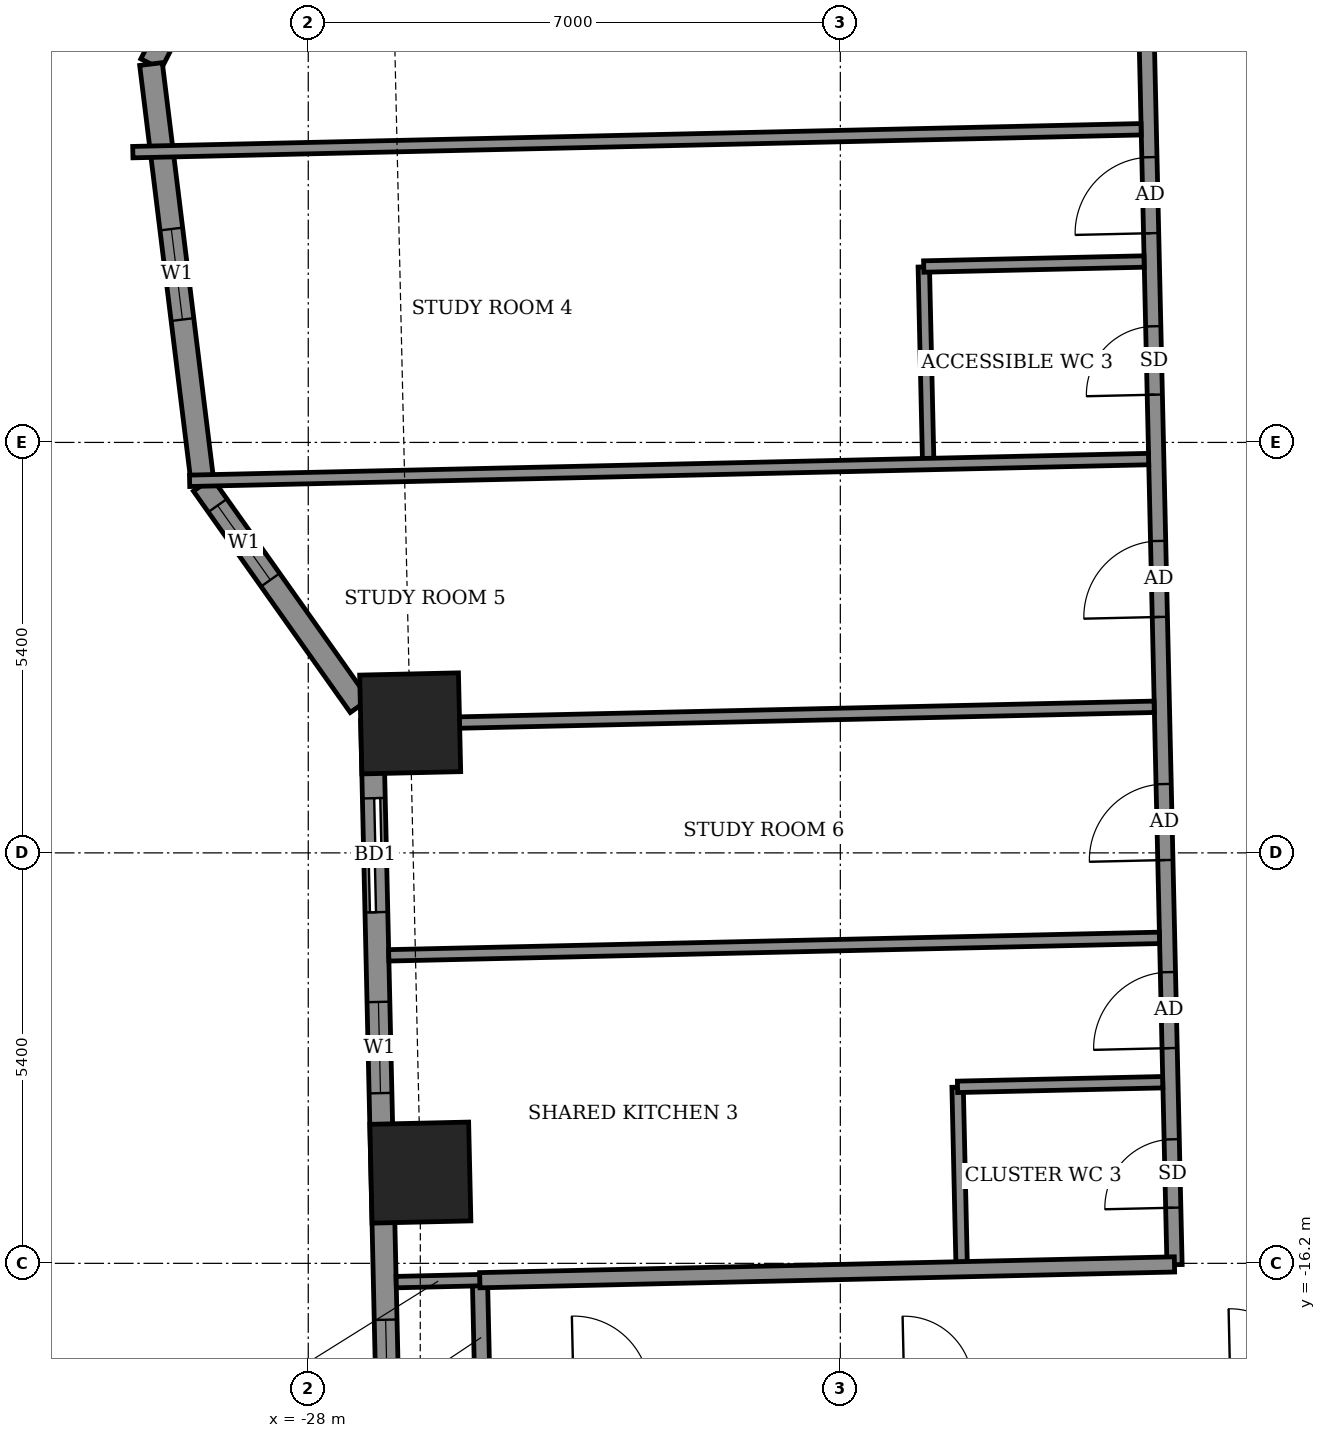
"""IFC4 building model, lengths in metres.
Left out: names, types, materials, properties, quantities, classifications, styles, units other than length and angle.
Written with IfcOpenShell. Run it as: python <this file> out.ifc"""

import sys

from ifc_helpers import new_model, si_unit, direction, frame, frame_2d, origin, origin_2d, place, context, subcontext, project, spatial, rectangle, extrude, element, fill, save


model = new_model("IFC4")
c1 = context("Model", 3, precision=1e-05, world=origin(), true_north=direction((0.0, 1.0)))
c2 = subcontext(c1, "Body", "Model", "MODEL_VIEW")
j1 = project(units=[si_unit("LENGTHUNIT", "METRE"), si_unit("PLANEANGLEUNIT", "RADIAN")], contexts=[c1])
p1 = place(None, origin())
s1 = spatial("IfcSite", under=j1, at=p1, CompositionType="ELEMENT")
p2 = place(p1, origin())
s2 = spatial("IfcBuilding", under=s1, at=p2, CompositionType="ELEMENT")
p3 = place(p2, frame((0.0, 0.0, 130.1)))
s3 = spatial("IfcBuildingStorey", under=s2, at=p3, CompositionType="ELEMENT", Elevation=130.1)
for number, where, z_axis, x_axis in (
    (1, (-26.659, -9.096, -0.55), (0.0, 0.0, 1.0), (0.023, -1.0, 0.0)),
    (2, (-26.525, -15.006, -0.55), (0.0, 0.0, 1.0), (0.023, -1.0, 0.0)),
):
    element("IfcColumn", number, at=place(p3, frame(where, z_axis=z_axis, x_axis=x_axis)), inside=s3, PredefinedType="COLUMN", context=c2, shape_type="SweptSolid", body=[
        extrude(rectangle(XDim=1.3, YDim=1.3, at=origin_2d()), origin(), (0.0, 0.0, 1.0), 3.6),
    ])
p4 = place(p3, frame((-27.625, 4.392, 0.0), z_axis=(0.0, 0.0, 1.0), x_axis=(-0.45268572245, -0.891670138947, 0.0)))
e3 = element("IfcWall", 3, at=p4, inside=s3, PredefinedType="SOLIDWALL", context=c2, shape_type="SweptSolid", body=[
    extrude(rectangle(XDim=5.399, YDim=0.3, at=frame_2d((2.7, 0.0))), origin(), (0.0, 0.0, 1.0), 3.05),
])
p5 = place(p4, frame((2.008, 0.0, 0.9)))
e4 = element("IfcOpeningElement", 4, at=p5, cuts=e3, PredefinedType="OPENING", context=c2, shape_type="SweptSolid", body=[
    extrude(rectangle(XDim=1.2, YDim=1.5, at=frame_2d((0.6, 0.75))), frame((0.0, 0.16, 0.0), z_axis=(0.0, -1.0, 0.0), x_axis=(1.0, 0.0, 0.0)), (0.0, 0.0, 1.0), 0.32),
])
p6 = place(p3, frame((-30.069, -0.422, 0.0), z_axis=(0.0, 0.0, 1.0), x_axis=(0.122206978992, -0.992504636909, 0.0)))
e5 = element("IfcWall", 5, at=p6, inside=s3, PredefinedType="SOLIDWALL", context=c2, shape_type="SweptSolid", body=[
    extrude(rectangle(XDim=5.574, YDim=0.3, at=frame_2d((2.787, 0.0))), origin(), (0.0, 0.0, 1.0), 3.05),
])
p7 = place(p6, frame((2.187, 0.0, 0.9)))
e6 = element("IfcOpeningElement", 6, at=p7, cuts=e5, PredefinedType="OPENING", context=c2, shape_type="SweptSolid", body=[
    extrude(rectangle(XDim=1.2, YDim=1.5, at=frame_2d((0.6, 0.75))), frame((0.0, 0.16, 0.0), z_axis=(0.0, -1.0, 0.0), x_axis=(1.0, 0.0, 0.0)), (0.0, 0.0, 1.0), 0.32),
])
p8 = place(p3, frame((-29.388, -5.954, 0.0), z_axis=(0.0, 0.0, 1.0), x_axis=(0.578095163598, -0.815969351033, 0.0)))
e7 = element("IfcWall", 7, at=p8, inside=s3, PredefinedType="SOLIDWALL", context=c2, shape_type="SweptSolid", body=[
    extrude(rectangle(XDim=3.569, YDim=0.3, at=frame_2d((1.784, 0.0))), origin(), (0.0, 0.0, 1.0), 3.05),
])
p9 = place(p8, frame((0.338, 0.0, 0.9)))
e8 = element("IfcOpeningElement", 8, at=p9, cuts=e7, PredefinedType="OPENING", context=c2, shape_type="SweptSolid", body=[
    extrude(rectangle(XDim=1.2, YDim=1.5, at=frame_2d((0.6, 0.75))), frame((0.0, 0.16, 0.0), z_axis=(0.0, -1.0, 0.0), x_axis=(1.0, 0.0, 0.0)), (0.0, 0.0, 1.0), 0.32),
])
p10 = place(p3, frame((-27.161, -9.052, 0.0), z_axis=(0.0, 0.0, 1.0), x_axis=(0.022665616813, -0.999743101909, 0.0)))
e9 = element("IfcWall", 9, at=p10, inside=s3, PredefinedType="SOLIDWALL", context=c2, shape_type="SweptSolid", body=[
    extrude(rectangle(XDim=11.73, YDim=0.3, at=frame_2d((5.865, 0.0))), origin(), (0.0, 0.0, 1.0), 3.05),
])
p11 = place(p10, frame((1.029, 0.0, 0.0)))
e10 = element("IfcOpeningElement", 10, at=p11, cuts=e9, PredefinedType="OPENING", context=c2, shape_type="SweptSolid", body=[
    extrude(rectangle(XDim=1.5, YDim=2.4, at=frame_2d((0.75, 1.2))), frame((0.0, 0.16, 0.0), z_axis=(0.0, -1.0, 0.0), x_axis=(1.0, 0.0, 0.0)), (0.0, 0.0, 1.0), 0.32),
])
p12 = place(p10, frame((3.71, 0.0, 0.9)))
e11 = element("IfcOpeningElement", 11, at=p12, cuts=e9, PredefinedType="OPENING", context=c2, shape_type="SweptSolid", body=[
    extrude(rectangle(XDim=1.2, YDim=1.5, at=frame_2d((0.6, 0.75))), frame((0.0, 0.16, 0.0), z_axis=(0.0, -1.0, 0.0), x_axis=(1.0, 0.0, 0.0)), (0.0, 0.0, 1.0), 0.32),
])
p13 = place(p10, frame((7.892, 0.0, 0.9)))
e12 = element("IfcOpeningElement", 12, at=p13, cuts=e9, PredefinedType="OPENING", context=c2, shape_type="SweptSolid", body=[
    extrude(rectangle(XDim=2.4, YDim=1.5, at=frame_2d((1.2, 0.75))), frame((0.0, 0.16, 0.0), z_axis=(0.0, -1.0, 0.0), x_axis=(1.0, 0.0, 0.0)), (0.0, 0.0, 1.0), 0.32),
])
p14 = place(p3, frame((-25.707, -17.925, 0.0), z_axis=(0.0, 0.0, 1.0), x_axis=(-0.022617910375, 0.999744182344, 0.0)))
e13 = element("IfcWall", 13, at=p14, inside=s3, PredefinedType="PARTITIONING", context=c2, shape_type="SweptSolid", body=[
    extrude(rectangle(XDim=1.5, YDim=0.2, at=frame_2d((0.75, 0.0))), origin(), (0.0, 0.0, 1.0), 3.05),
])
p15 = place(p3, frame((-19.405, -16.182, 0.0), z_axis=(0.0, 0.0, 1.0), x_axis=(-0.022605686808, 0.999744458811, 0.0)))
e14 = element("IfcWall", 14, at=p15, inside=s3, PredefinedType="PARTITIONING", context=c2, shape_type="SweptSolid", body=[
    extrude(rectangle(XDim=2.3, YDim=0.15, at=frame_2d((1.15, 0.0))), origin(), (0.0, 0.0, 1.0), 3.05),
])
p16 = place(p3, frame((-16.603, -16.218, 0.0), z_axis=(0.0, 0.0, 1.0), x_axis=(-0.022698146637, 0.999742363881, 0.0)))
e15 = element("IfcWall", 15, at=p16, inside=s3, PredefinedType="PARTITIONING", context=c2, shape_type="SweptSolid", body=[
    extrude(rectangle(XDim=28.374, YDim=0.2, at=frame_2d((14.187, 0.0))), origin(), (0.0, 0.0, 1.0), 3.05),
])
p17 = place(p16, frame((24.537, 0.0, 0.0)))
e16 = element("IfcOpeningElement", 16, at=p17, cuts=e15, PredefinedType="OPENING", context=c2, shape_type="SweptSolid", body=[
    extrude(rectangle(XDim=1.0, YDim=2.1, at=frame_2d((0.5, 1.05))), frame((0.0, 0.11, 0.0), z_axis=(0.0, -1.0, 0.0), x_axis=(1.0, 0.0, 0.0)), (0.0, 0.0, 1.0), 0.22),
])
p18 = place(p16, frame((26.724, 0.0, 0.0)))
e17 = element("IfcOpeningElement", 17, at=p18, cuts=e15, PredefinedType="OPENING", context=c2, shape_type="SweptSolid", body=[
    extrude(rectangle(XDim=0.9, YDim=2.1, at=frame_2d((0.45, 1.05))), frame((0.0, 0.11, 0.0), z_axis=(0.0, -1.0, 0.0), x_axis=(1.0, 0.0, 0.0)), (0.0, 0.0, 1.0), 0.22),
])
p19 = place(p16, frame((22.099, 0.0, 0.0)))
e18 = element("IfcOpeningElement", 18, at=p19, cuts=e15, PredefinedType="OPENING", context=c2, shape_type="SweptSolid", body=[
    extrude(rectangle(XDim=1.0, YDim=2.1, at=frame_2d((0.5, 1.05))), frame((0.0, 0.11, 0.0), z_axis=(0.0, -1.0, 0.0), x_axis=(1.0, 0.0, 0.0)), (0.0, 0.0, 1.0), 0.22),
])
p20 = place(p16, frame((16.324, 0.0, 0.0)))
e19 = element("IfcOpeningElement", 19, at=p20, cuts=e15, PredefinedType="OPENING", context=c2, shape_type="SweptSolid", body=[
    extrude(rectangle(XDim=1.0, YDim=2.1, at=frame_2d((0.5, 1.05))), frame((0.0, 0.11, 0.0), z_axis=(0.0, -1.0, 0.0), x_axis=(1.0, 0.0, 0.0)), (0.0, 0.0, 1.0), 0.22),
])
p21 = place(p16, frame((19.449, 0.0, 0.0)))
e20 = element("IfcOpeningElement", 20, at=p21, cuts=e15, PredefinedType="OPENING", context=c2, shape_type="SweptSolid", body=[
    extrude(rectangle(XDim=0.9, YDim=2.1, at=frame_2d((0.45, 1.05))), frame((0.0, 0.11, 0.0), z_axis=(0.0, -1.0, 0.0), x_axis=(1.0, 0.0, 0.0)), (0.0, 0.0, 1.0), 0.22),
])
p22 = place(p16, frame((13.574, 0.0, 0.0)))
e21 = element("IfcOpeningElement", 21, at=p22, cuts=e15, PredefinedType="OPENING", context=c2, shape_type="SweptSolid", body=[
    extrude(rectangle(XDim=1.0, YDim=2.1, at=frame_2d((0.5, 1.05))), frame((0.0, 0.11, 0.0), z_axis=(0.0, -1.0, 0.0), x_axis=(1.0, 0.0, 0.0)), (0.0, 0.0, 1.0), 0.22),
])
p23 = place(p16, frame((11.449, 0.0, 0.0)))
e22 = element("IfcOpeningElement", 22, at=p23, cuts=e15, PredefinedType="OPENING", context=c2, shape_type="SweptSolid", body=[
    extrude(rectangle(XDim=0.9, YDim=2.1, at=frame_2d((0.45, 1.05))), frame((0.0, 0.11, 0.0), z_axis=(0.0, -1.0, 0.0), x_axis=(1.0, 0.0, 0.0)), (0.0, 0.0, 1.0), 0.22),
])
p24 = place(p16, frame((8.524, 0.0, 0.0)))
e23 = element("IfcOpeningElement", 23, at=p24, cuts=e15, PredefinedType="OPENING", context=c2, shape_type="SweptSolid", body=[
    extrude(rectangle(XDim=1.0, YDim=2.1, at=frame_2d((0.5, 1.05))), frame((0.0, 0.11, 0.0), z_axis=(0.0, -1.0, 0.0), x_axis=(1.0, 0.0, 0.0)), (0.0, 0.0, 1.0), 0.22),
])
p25 = place(p16, frame((5.325, 0.0, 0.0)))
e24 = element("IfcOpeningElement", 24, at=p25, cuts=e15, PredefinedType="OPENING", context=c2, shape_type="SweptSolid", body=[
    extrude(rectangle(XDim=1.0, YDim=2.1, at=frame_2d((0.5, 1.05))), frame((0.0, 0.11, 0.0), z_axis=(0.0, -1.0, 0.0), x_axis=(1.0, 0.0, 0.0)), (0.0, 0.0, 1.0), 0.22),
])
p26 = place(p16, frame((2.85, 0.0, 0.0)))
e25 = element("IfcOpeningElement", 25, at=p26, cuts=e15, PredefinedType="OPENING", context=c2, shape_type="SweptSolid", body=[
    extrude(rectangle(XDim=1.0, YDim=2.1, at=frame_2d((0.5, 1.05))), frame((0.0, 0.11, 0.0), z_axis=(0.0, -1.0, 0.0), x_axis=(1.0, 0.0, 0.0)), (0.0, 0.0, 1.0), 0.22),
])
p27 = place(p16, frame((0.75, 0.0, 0.0)))
e26 = element("IfcOpeningElement", 26, at=p27, cuts=e15, PredefinedType="OPENING", context=c2, shape_type="SweptSolid", body=[
    extrude(rectangle(XDim=0.9, YDim=2.1, at=frame_2d((0.45, 1.05))), frame((0.0, 0.11, 0.0), z_axis=(0.0, -1.0, 0.0), x_axis=(1.0, 0.0, 0.0)), (0.0, 0.0, 1.0), 0.22),
])
p28 = place(p3, frame((-26.843, -16.447, 0.0), z_axis=(0.0, 0.0, 1.0), x_axis=(0.999720170098, 0.023655475055, 0.0)))
e27 = element("IfcWall", 27, at=p28, inside=s3, PredefinedType="PARTITIONING", context=c2, shape_type="SweptSolid", body=[
    extrude(rectangle(XDim=1.104, YDim=0.15, at=frame_2d((0.552, 0.0))), origin(), (0.0, 0.0, 1.0), 2.55),
])
p29 = place(p3, frame((-25.743, -16.422, 0.0), z_axis=(0.0, 0.0, 1.0), x_axis=(0.999741076645, 0.022754772455, 0.0)))
e28 = element("IfcWall", 28, at=p29, inside=s3, PredefinedType="PARTITIONING", context=c2, shape_type="SweptSolid", body=[
    extrude(rectangle(XDim=9.141, YDim=0.2, at=frame_2d((4.571, 0.0))), origin(), (0.0, 0.0, 1.0), 3.05),
])
p30 = place(p3, frame((-19.458, -13.878, 0.0), z_axis=(0.0, 0.0, 1.0), x_axis=(0.999744396973, 0.02260842146, 0.0)))
e29 = element("IfcWall", 29, at=p30, inside=s3, PredefinedType="PARTITIONING", context=c2, shape_type="SweptSolid", body=[
    extrude(rectangle(XDim=2.7, YDim=0.15, at=frame_2d((1.35, 0.0))), origin(), (0.0, 0.0, 1.0), 3.05),
])
p31 = place(p3, frame((-26.941, -12.148, 0.0), z_axis=(0.0, 0.0, 1.0), x_axis=(0.999742841246, 0.022677111331, 0.0)))
e30 = element("IfcWall", 30, at=p31, inside=s3, PredefinedType="PARTITIONING", context=c2, shape_type="SweptSolid", body=[
    extrude(rectangle(XDim=10.142, YDim=0.15, at=frame_2d((5.071, 0.0))), origin(), (0.0, 0.0, 1.0), 2.55),
])
p32 = place(p3, frame((-27.01, -9.108, 0.0), z_axis=(0.0, 0.0, 1.0), x_axis=(0.999742841246, 0.022677111331, 0.0)))
e31 = element("IfcWall", 31, at=p32, inside=s3, PredefinedType="PARTITIONING", context=c2, shape_type="SweptSolid", body=[
    extrude(rectangle(XDim=10.142, YDim=0.15, at=frame_2d((5.071, 0.0))), origin(), (0.0, 0.0, 1.0), 3.05),
])
p33 = place(p3, frame((-19.845, -5.615, 0.0), z_axis=(0.0, 0.0, 1.0), x_axis=(-0.022629142889, 0.99974392816, 0.0)))
e32 = element("IfcWall", 32, at=p33, inside=s3, PredefinedType="PARTITIONING", context=c2, shape_type="SweptSolid", body=[
    extrude(rectangle(XDim=2.525, YDim=0.15, at=frame_2d((1.262, 0.0))), origin(), (0.0, 0.0, 1.0), 3.05),
])
p34 = place(p3, frame((-29.561, -5.905, 0.0), z_axis=(0.0, 0.0, 1.0), x_axis=(0.999742903154, 0.022674381858, 0.0)))
e33 = element("IfcWall", 33, at=p34, inside=s3, PredefinedType="PARTITIONING", context=c2, shape_type="SweptSolid", body=[
    extrude(rectangle(XDim=12.619, YDim=0.15, at=frame_2d((6.31, 0.0))), origin(), (0.0, 0.0, 1.0), 2.05),
])
p35 = place(p3, frame((-19.903, -3.086, 0.0), z_axis=(0.0, 0.0, 1.0), x_axis=(0.999741618182, 0.022730967319, 0.0)))
e34 = element("IfcWall", 34, at=p35, inside=s3, PredefinedType="PARTITIONING", context=c2, shape_type="SweptSolid", body=[
    extrude(rectangle(XDim=2.9, YDim=0.15, at=frame_2d((1.45, 0.0))), origin(), (0.0, 0.0, 1.0), 3.05),
])
p36 = place(p3, frame((-30.308, -1.581, 0.0), z_axis=(0.0, 0.0, 1.0), x_axis=(0.999742613892, 0.022687132236, 0.0)))
e35 = element("IfcWall", 35, at=p36, inside=s3, PredefinedType="PARTITIONING", context=c2, shape_type="SweptSolid", body=[
    extrude(rectangle(XDim=13.269, YDim=0.15, at=frame_2d((6.634, 0.0))), origin(), (0.0, 0.0, 1.0), 2.05),
])
p37 = place(p7, origin())
e36 = element("IfcWindow", 36, at=p37, inside=s3, PartitioningType="SINGLE_PANEL", PredefinedType="WINDOW", context=c2, shape_type="SweptSolid", body=[
    extrude(rectangle(XDim=1.2, YDim=1.5, at=frame_2d((0.6, 0.75))), frame((0.0, 0.03, 0.0), z_axis=(0.0, -1.0, 0.0), x_axis=(1.0, 0.0, 0.0)), (0.0, 0.0, 1.0), 0.06),
])
fill(e6, e36)
p38 = place(p9, origin())
e37 = element("IfcWindow", 37, at=p38, inside=s3, PartitioningType="SINGLE_PANEL", PredefinedType="WINDOW", context=c2, shape_type="SweptSolid", body=[
    extrude(rectangle(XDim=1.2, YDim=1.5, at=frame_2d((0.6, 0.75))), frame((0.0, 0.03, 0.0), z_axis=(0.0, -1.0, 0.0), x_axis=(1.0, 0.0, 0.0)), (0.0, 0.0, 1.0), 0.06),
])
fill(e8, e37)
p39 = place(p11, origin())
e38 = element("IfcDoor", 38, at=p39, inside=s3, OperationType="SLIDING_TO_LEFT", PredefinedType="DOOR", context=c2, shape_type="SweptSolid", body=[
    extrude(rectangle(XDim=1.5, YDim=2.4, at=frame_2d((0.75, 1.2))), frame((0.0, 0.025, 0.0), z_axis=(0.0, -1.0, 0.0), x_axis=(1.0, 0.0, 0.0)), (0.0, 0.0, 1.0), 0.05),
])
fill(e10, e38)
p40 = place(p12, origin())
e39 = element("IfcWindow", 39, at=p40, inside=s3, PartitioningType="SINGLE_PANEL", PredefinedType="WINDOW", context=c2, shape_type="SweptSolid", body=[
    extrude(rectangle(XDim=1.2, YDim=1.5, at=frame_2d((0.6, 0.75))), frame((0.0, 0.03, 0.0), z_axis=(0.0, -1.0, 0.0), x_axis=(1.0, 0.0, 0.0)), (0.0, 0.0, 1.0), 0.06),
])
fill(e11, e39)
p41 = place(p13, origin())
e40 = element("IfcWindow", 40, at=p41, inside=s3, PartitioningType="DOUBLE_PANEL_VERTICAL", PredefinedType="WINDOW", context=c2, shape_type="SweptSolid", body=[
    extrude(rectangle(XDim=2.4, YDim=1.5, at=frame_2d((1.2, 0.75))), frame((0.0, 0.03, 0.0), z_axis=(0.0, -1.0, 0.0), x_axis=(1.0, 0.0, 0.0)), (0.0, 0.0, 1.0), 0.06),
])
fill(e12, e40)
p42 = place(p22, origin())
e41 = element("IfcDoor", 41, at=p42, inside=s3, OperationType="SINGLE_SWING_LEFT", PredefinedType="DOOR", context=c2, shape_type="SweptSolid", body=[
    extrude(rectangle(XDim=1.0, YDim=2.1, at=frame_2d((0.5, 1.05))), frame((0.0, 0.025, 0.0), z_axis=(0.0, -1.0, 0.0), x_axis=(1.0, 0.0, 0.0)), (0.0, 0.0, 1.0), 0.05),
])
fill(e21, e41)
p43 = place(p23, origin())
e42 = element("IfcDoor", 42, at=p43, inside=s3, OperationType="SINGLE_SWING_LEFT", PredefinedType="DOOR", context=c2, shape_type="SweptSolid", body=[
    extrude(rectangle(XDim=0.9, YDim=2.1, at=frame_2d((0.45, 1.05))), frame((0.0, 0.025, 0.0), z_axis=(0.0, -1.0, 0.0), x_axis=(1.0, 0.0, 0.0)), (0.0, 0.0, 1.0), 0.05),
])
fill(e22, e42)
p44 = place(p24, origin())
e43 = element("IfcDoor", 43, at=p44, inside=s3, OperationType="SINGLE_SWING_RIGHT", PredefinedType="DOOR", context=c2, shape_type="SweptSolid", body=[
    extrude(rectangle(XDim=1.0, YDim=2.1, at=frame_2d((0.5, 1.05))), frame((0.0, 0.025, 0.0), z_axis=(0.0, -1.0, 0.0), x_axis=(1.0, 0.0, 0.0)), (0.0, 0.0, 1.0), 0.05),
])
fill(e23, e43)
p45 = place(p25, origin())
e44 = element("IfcDoor", 44, at=p45, inside=s3, OperationType="SINGLE_SWING_LEFT", PredefinedType="DOOR", context=c2, shape_type="SweptSolid", body=[
    extrude(rectangle(XDim=1.0, YDim=2.1, at=frame_2d((0.5, 1.05))), frame((0.0, 0.025, 0.0), z_axis=(0.0, -1.0, 0.0), x_axis=(1.0, 0.0, 0.0)), (0.0, 0.0, 1.0), 0.05),
])
fill(e24, e44)
p46 = place(p26, origin())
e45 = element("IfcDoor", 45, at=p46, inside=s3, OperationType="SINGLE_SWING_RIGHT", PredefinedType="DOOR", context=c2, shape_type="SweptSolid", body=[
    extrude(rectangle(XDim=1.0, YDim=2.1, at=frame_2d((0.5, 1.05))), frame((0.0, 0.025, 0.0), z_axis=(0.0, -1.0, 0.0), x_axis=(1.0, 0.0, 0.0)), (0.0, 0.0, 1.0), 0.05),
])
fill(e25, e45)
p47 = place(p27, origin())
e46 = element("IfcDoor", 46, at=p47, inside=s3, OperationType="SINGLE_SWING_RIGHT", PredefinedType="DOOR", context=c2, shape_type="SweptSolid", body=[
    extrude(rectangle(XDim=0.9, YDim=2.1, at=frame_2d((0.45, 1.05))), frame((0.0, 0.025, 0.0), z_axis=(0.0, -1.0, 0.0), x_axis=(1.0, 0.0, 0.0)), (0.0, 0.0, 1.0), 0.05),
])
fill(e26, e46)
save(model, sys.argv[1])
